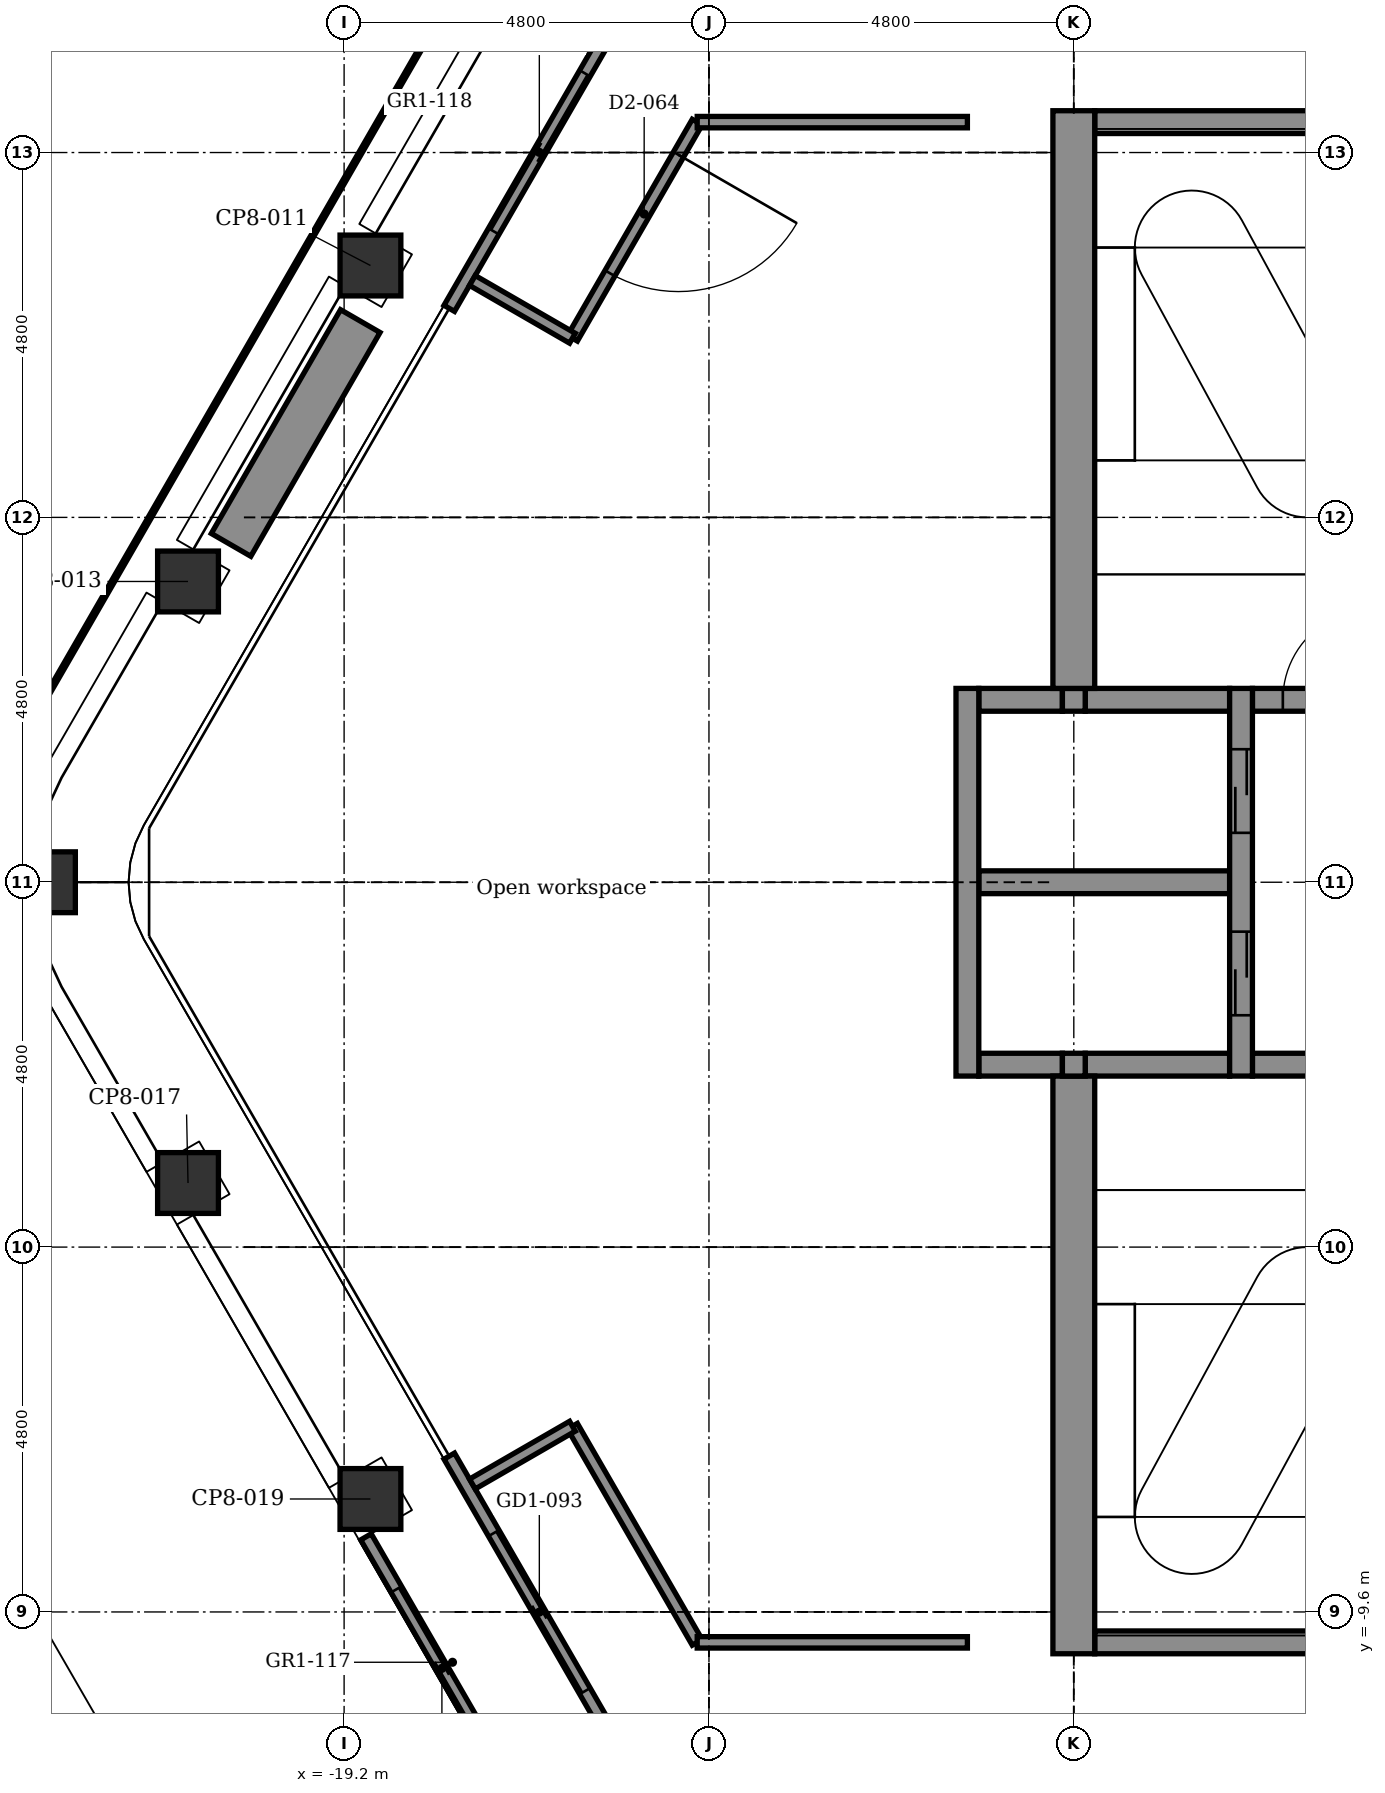
"""IFC4 building model, lengths in metres.
Left out: names, types, materials, properties, quantities, classifications, styles, units other than length and angle.
Written with IfcOpenShell. Run it as: python <this file> out.ifc"""

import sys

from ifc_helpers import new_model, si_unit, direction, frame, frame_2d, origin, origin_2d, place, context, subcontext, project, spatial, rectangle, extrude, element, fill, save


model = new_model("IFC4")
c1 = context("Model", 3, precision=1e-05, world=origin(), true_north=direction((0.0, 1.0)))
c2 = subcontext(c1, "Body", "Model", "MODEL_VIEW")
j1 = project(units=[si_unit("LENGTHUNIT", "METRE"), si_unit("PLANEANGLEUNIT", "RADIAN")], contexts=[c1])
p1 = place(None, origin())
s1 = spatial("IfcSite", under=j1, at=p1, CompositionType="ELEMENT")
p2 = place(p1, origin())
s2 = spatial("IfcBuilding", under=s1, at=p2, CompositionType="ELEMENT")
p3 = place(p2, frame((0.0, 0.0, 222.8)))
s3 = spatial("IfcBuildingStorey", under=s2, at=p3, CompositionType="ELEMENT", Elevation=222.8)
for number, where, z_axis, x_axis in (
    (1, (-18.854, -8.114, -0.15), (0.0, 0.0, 1.0), (0.866, 0.5, 0.0)),
    (2, (-21.254, -3.957, -0.15), (0.0, 0.0, 1.0), (0.866, 0.5, 0.0)),
    (3, (-23.136, 0.0, -0.15), (0.0, 0.0, 1.0), (1.0, 0.0, 0.0)),
    (4, (-21.254, 3.957, -0.15), (0.0, 0.0, 1.0), (0.5, 0.866, 0.0)),
    (5, (-18.854, 8.114, -0.15), (0.0, 0.0, 1.0), (0.5, 0.866, 0.0)),
):
    element("IfcColumn", number, at=place(p3, frame(where, z_axis=z_axis, x_axis=x_axis)), inside=s3, PredefinedType="COLUMN", context=c2, shape_type="SweptSolid", body=[
        extrude(rectangle(XDim=0.8, YDim=0.8, at=origin_2d()), origin(), (0.0, 0.0, 1.0), 3.9),
    ])
p4 = place(p3, frame((-9.325, -10.0, -0.15), z_axis=(0.0, 0.0, 1.0), x_axis=(1.0, 0.0, 0.0)))
e6 = element("IfcWall", 6, at=p4, inside=s3, PredefinedType="STANDARD", context=c2, shape_type="SweptSolid", body=[
    extrude(rectangle(XDim=4.075, YDim=0.3, at=frame_2d((2.038, 0.0))), origin(), (0.0, 0.0, 1.0), 3.9),
])
p5 = place(p3, frame((-10.85, -2.4, -0.15), z_axis=(0.0, 0.0, 1.0), x_axis=(1.0, 0.0, 0.0)))
e7 = element("IfcWall", 7, at=p5, inside=s3, PredefinedType="STANDARD", context=c2, shape_type="SweptSolid", body=[
    extrude(rectangle(XDim=1.1, YDim=0.3, at=frame_2d((0.55, 0.0))), origin(), (0.0, 0.0, 1.0), 3.9),
])
p6 = place(p3, frame((-9.45, -2.4, -0.15), z_axis=(0.0, 0.0, 1.0), x_axis=(1.0, 0.0, 0.0)))
e8 = element("IfcWall", 8, at=p6, inside=s3, PredefinedType="STANDARD", context=c2, shape_type="SweptSolid", body=[
    extrude(rectangle(XDim=1.9, YDim=0.3, at=frame_2d((0.95, 0.0))), origin(), (0.0, 0.0, 1.0), 3.9),
])
p7 = place(p3, frame((-7.25, -2.4, -0.15), z_axis=(0.0, 0.0, 1.0), x_axis=(1.0, 0.0, 0.0)))
e9 = element("IfcWall", 9, at=p7, inside=s3, PredefinedType="STANDARD", context=c2, shape_type="SweptSolid", body=[
    extrude(rectangle(XDim=2.0, YDim=0.3, at=frame_2d((1.0, 0.0))), origin(), (0.0, 0.0, 1.0), 3.9),
])
p8 = place(p3, frame((-10.85, 0.0, -0.15), z_axis=(0.0, 0.0, 1.0), x_axis=(1.0, 0.0, 0.0)))
e10 = element("IfcWall", 10, at=p8, inside=s3, PredefinedType="STANDARD", context=c2, shape_type="SweptSolid", body=[
    extrude(rectangle(XDim=3.3, YDim=0.3, at=frame_2d((1.65, 0.0))), origin(), (0.0, 0.0, 1.0), 3.9),
])
p9 = place(p3, frame((-10.85, 2.4, -0.15), z_axis=(0.0, 0.0, 1.0), x_axis=(1.0, 0.0, 0.0)))
e11 = element("IfcWall", 11, at=p9, inside=s3, PredefinedType="STANDARD", context=c2, shape_type="SweptSolid", body=[
    extrude(rectangle(XDim=1.1, YDim=0.3, at=frame_2d((0.55, 0.0))), origin(), (0.0, 0.0, 1.0), 3.9),
])
p10 = place(p3, frame((-9.45, 2.4, -0.15), z_axis=(0.0, 0.0, 1.0), x_axis=(1.0, 0.0, 0.0)))
e12 = element("IfcWall", 12, at=p10, inside=s3, PredefinedType="STANDARD", context=c2, shape_type="SweptSolid", body=[
    extrude(rectangle(XDim=1.9, YDim=0.3, at=frame_2d((0.95, 0.0))), origin(), (0.0, 0.0, 1.0), 3.9),
])
p11 = place(p3, frame((-7.25, 2.4, -0.15), z_axis=(0.0, 0.0, 1.0), x_axis=(1.0, 0.0, 0.0)))
e13 = element("IfcWall", 13, at=p11, inside=s3, PredefinedType="STANDARD", context=c2, shape_type="SweptSolid", body=[
    extrude(rectangle(XDim=2.0, YDim=0.3, at=frame_2d((1.0, 0.0))), origin(), (0.0, 0.0, 1.0), 3.9),
])
p12 = place(p11, frame((0.4, 0.0, 0.15)))
e14 = element("IfcOpeningElement", 14, at=p12, cuts=e13, PredefinedType="OPENING", context=c2, shape_type="SweptSolid", body=[
    extrude(rectangle(XDim=1.2, YDim=2.1, at=frame_2d((0.6, 1.05))), frame((0.0, 0.16, 0.0), z_axis=(0.0, -1.0, 0.0), x_axis=(1.0, 0.0, 0.0)), (0.0, 0.0, 1.0), 0.32),
])
p13 = place(p3, frame((-9.325, 10.0, -0.15), z_axis=(0.0, 0.0, 1.0), x_axis=(1.0, 0.0, 0.0)))
e15 = element("IfcWall", 15, at=p13, inside=s3, PredefinedType="STANDARD", context=c2, shape_type="SweptSolid", body=[
    extrude(rectangle(XDim=4.075, YDim=0.3, at=frame_2d((2.038, 0.0))), origin(), (0.0, 0.0, 1.0), 3.9),
])
p14 = place(p3, frame((-11.0, -2.55, -0.15), z_axis=(0.0, 0.0, 1.0), x_axis=(0.0, 1.0, 0.0)))
e16 = element("IfcWall", 16, at=p14, inside=s3, PredefinedType="STANDARD", context=c2, shape_type="SweptSolid", body=[
    extrude(rectangle(XDim=5.1, YDim=0.3, at=frame_2d((2.55, 0.0))), origin(), (0.0, 0.0, 1.0), 3.9),
])
p15 = place(p3, frame((-9.6, -10.15, -0.15), z_axis=(0.0, 0.0, 1.0), x_axis=(0.0, 1.0, 0.0)))
e17 = element("IfcWall", 17, at=p15, inside=s3, PredefinedType="SHEAR", context=c2, shape_type="SweptSolid", body=[
    extrude(rectangle(XDim=7.6, YDim=0.55, at=frame_2d((3.8, 0.0))), origin(), (0.0, 0.0, 1.0), 3.9),
])
for number, where, z_axis, x_axis in (
    (18, (-9.6, -2.55, -0.15), (0.0, 0.0, 1.0), (0.0, 1.0, 0.0)),
    (19, (-9.6, 2.25, -0.15), (0.0, 0.0, 1.0), (0.0, 1.0, 0.0)),
):
    element("IfcWall", number, at=place(p3, frame(where, z_axis=z_axis, x_axis=x_axis)), inside=s3, PredefinedType="STANDARD", context=c2, shape_type="SweptSolid", body=[
        extrude(rectangle(XDim=0.3, YDim=0.3, at=frame_2d((0.15, 0.0))), origin(), (0.0, 0.0, 1.0), 3.9),
    ])
p16 = place(p3, frame((-9.6, 2.55, -0.15), z_axis=(0.0, 0.0, 1.0), x_axis=(0.0, 1.0, 0.0)))
e20 = element("IfcWall", 20, at=p16, inside=s3, PredefinedType="SHEAR", context=c2, shape_type="SweptSolid", body=[
    extrude(rectangle(XDim=7.6, YDim=0.55, at=frame_2d((3.8, 0.0))), origin(), (0.0, 0.0, 1.0), 3.9),
])
p17 = place(p3, frame((-7.4, -2.55, -0.15), z_axis=(0.0, 0.0, 1.0), x_axis=(0.0, 1.0, 0.0)))
e21 = element("IfcWall", 21, at=p17, inside=s3, PredefinedType="STANDARD", context=c2, shape_type="SweptSolid", body=[
    extrude(rectangle(XDim=5.1, YDim=0.3, at=frame_2d((2.55, 0.0))), origin(), (0.0, 0.0, 1.0), 3.9),
])
p18 = place(p17, frame((0.8, 0.0, 0.15)))
e22 = element("IfcOpeningElement", 22, at=p18, cuts=e21, PredefinedType="OPENING", context=c2, shape_type="SweptSolid", body=[
    extrude(rectangle(XDim=1.1, YDim=2.1, at=frame_2d((0.55, 1.05))), frame((0.0, 0.16, 0.0), z_axis=(0.0, -1.0, 0.0), x_axis=(1.0, 0.0, 0.0)), (0.0, 0.0, 1.0), 0.32),
])
p19 = place(p17, frame((3.2, 0.0, 0.15)))
e23 = element("IfcOpeningElement", 23, at=p19, cuts=e21, PredefinedType="OPENING", context=c2, shape_type="SweptSolid", body=[
    extrude(rectangle(XDim=1.1, YDim=2.1, at=frame_2d((0.55, 1.05))), frame((0.0, 0.16, 0.0), z_axis=(0.0, -1.0, 0.0), x_axis=(1.0, 0.0, 0.0)), (0.0, 0.0, 1.0), 0.32),
])
p20 = place(p3, frame((-15.447, -11.655, 0.0), z_axis=(0.0, 0.0, 1.0), x_axis=(-0.499978080042, 0.866038058908, 0.0)))
e24 = element("IfcWall", 24, at=p20, inside=s3, PredefinedType="PARTITIONING", context=c2, shape_type="SweptSolid", body=[
    extrude(rectangle(XDim=4.74, YDim=0.16, at=frame_2d((2.37, 0.0))), origin(), (0.0, 0.0, 1.0), 3.75),
])
p21 = place(p20, frame((1.17, 0.0, 0.0)))
e25 = element("IfcOpeningElement", 25, at=p21, cuts=e24, PredefinedType="OPENING", context=c2, shape_type="SweptSolid", body=[
    extrude(rectangle(XDim=2.4, YDim=2.4, at=frame_2d((1.2, 1.2))), frame((0.0, 0.09, 0.0), z_axis=(0.0, -1.0, 0.0), x_axis=(1.0, 0.0, 0.0)), (0.0, 0.0, 1.0), 0.18),
])
p22 = place(p3, frame((-17.817, 7.55, 0.0), z_axis=(0.0, 0.0, 1.0), x_axis=(0.499978080042, 0.866038058908, 0.0)))
e26 = element("IfcWall", 26, at=p22, inside=s3, PredefinedType="PARTITIONING", context=c2, shape_type="SweptSolid", body=[
    extrude(rectangle(XDim=4.74, YDim=0.16, at=frame_2d((2.37, 0.0))), origin(), (0.0, 0.0, 1.0), 3.75),
])
p23 = place(p22, frame((1.17, 0.0, 0.0)))
e27 = element("IfcOpeningElement", 27, at=p23, cuts=e26, PredefinedType="OPENING", context=c2, shape_type="SweptSolid", body=[
    extrude(rectangle(XDim=2.4, YDim=2.4, at=frame_2d((1.2, 1.2))), frame((0.0, 0.09, 0.0), z_axis=(0.0, -1.0, 0.0), x_axis=(1.0, 0.0, 0.0)), (0.0, 0.0, 1.0), 0.18),
])
p24 = place(p3, frame((-20.687, 4.438, 0.0), z_axis=(0.0, 0.0, 1.0), x_axis=(0.500008388397, 0.866020560687, 0.0)))
e28 = element("IfcWall", 28, at=p24, inside=s3, PredefinedType="USERDEFINED", context=c2, shape_type="SweptSolid", body=[
    extrude(rectangle(XDim=3.4, YDim=0.6, at=frame_2d((1.7, 0.0))), origin(), (0.0, 0.0, 1.0), 0.7),
])
p25 = place(p3, frame((-16.914, -12.073, 0.0), z_axis=(0.0, 0.0, 1.0), x_axis=(-0.500029202507, 0.866008543052, 0.0)))
e29 = element("IfcWall", 29, at=p25, inside=s3, PredefinedType="PARTITIONING", context=c2, shape_type="SweptSolid", body=[
    extrude(rectangle(XDim=3.996, YDim=0.16, at=frame_2d((1.998, 0.0))), origin(), (0.0, 0.0, 1.0), 2.85),
])
p26 = place(p25, frame((0.798, 0.0, 0.0)))
e30 = element("IfcOpeningElement", 30, at=p26, cuts=e29, PredefinedType="OPENING", context=c2, shape_type="SweptSolid", body=[
    extrude(rectangle(XDim=2.4, YDim=2.4, at=frame_2d((1.2, 1.2))), frame((0.0, 0.09, 0.0), z_axis=(0.0, -1.0, 0.0), x_axis=(1.0, 0.0, 0.0)), (0.0, 0.0, 1.0), 0.18),
])
p27 = place(p3, frame((-16.196, -7.157, 0.0), z_axis=(0.0, 0.0, 1.0), x_axis=(0.499954196102, -0.866051847062, 0.0)))
e31 = element("IfcWall", 31, at=p27, inside=s3, PredefinedType="PARTITIONING", context=c2, shape_type="SweptSolid", body=[
    extrude(rectangle(XDim=3.283, YDim=0.15, at=frame_2d((1.642, 0.0))), origin(), (0.0, 0.0, 1.0), 3.75),
])
p28 = place(p3, frame((-16.196, 7.157, 0.0), z_axis=(0.0, 0.0, 1.0), x_axis=(0.499954196102, 0.866051847062, 0.0)))
e32 = element("IfcWall", 32, at=p28, inside=s3, PredefinedType="PARTITIONING", context=c2, shape_type="SweptSolid", body=[
    extrude(rectangle(XDim=3.283, YDim=0.15, at=frame_2d((1.642, 0.0))), origin(), (0.0, 0.0, 1.0), 3.75),
])
p29 = place(p28, frame((0.987, 0.0, 0.0)))
e33 = element("IfcOpeningElement", 33, at=p29, cuts=e32, PredefinedType="OPENING", context=c2, shape_type="SweptSolid", body=[
    extrude(rectangle(XDim=1.8, YDim=2.1, at=frame_2d((0.9, 1.05))), frame((0.0, 0.085, 0.0), z_axis=(0.0, -1.0, 0.0), x_axis=(1.0, 0.0, 0.0)), (0.0, 0.0, 1.0), 0.17),
])
for number, where, z_axis, x_axis in (
    (34, (-17.512, 7.917, 0.0), (0.0, 0.0, 1.0), (0.866, -0.5, 0.0)),
    (35, (-17.512, -7.917, 0.0), (0.0, 0.0, 1.0), (0.866, 0.5, 0.0)),
):
    element("IfcWall", number, at=place(p3, frame(where, z_axis=z_axis, x_axis=x_axis)), inside=s3, PredefinedType="PARTITIONING", context=c2, shape_type="SweptSolid", body=[
        extrude(rectangle(XDim=1.52, YDim=0.15, at=frame_2d((0.76, 0.0))), origin(), (0.0, 0.0, 1.0), 3.75),
    ])
for number, where, z_axis, x_axis in (
    (36, (-14.555, -10.0, 0.0), (0.0, 0.0, 1.0), (1.0, 0.0, 0.0)),
    (37, (-14.555, 10.0, 0.0), (0.0, 0.0, 1.0), (1.0, 0.0, 0.0)),
):
    element("IfcWall", number, at=place(p3, frame(where, z_axis=z_axis, x_axis=x_axis)), inside=s3, PredefinedType="PARTITIONING", context=c2, shape_type="SweptSolid", body=[
        extrude(rectangle(XDim=3.555, YDim=0.15, at=frame_2d((1.777, 0.0))), origin(), (0.0, 0.0, 1.0), 3.75),
    ])
p30 = place(p21, origin())
e38 = element("IfcDoor", 38, at=p30, inside=s3, OperationType="DOUBLE_DOOR_SLIDING", PredefinedType="DOOR", context=c2, shape_type="SweptSolid", body=[
    extrude(rectangle(XDim=2.4, YDim=2.4, at=frame_2d((1.2, 1.2))), frame((0.0, 0.025, 0.0), z_axis=(0.0, -1.0, 0.0), x_axis=(1.0, 0.0, 0.0)), (0.0, 0.0, 1.0), 0.05),
])
fill(e25, e38)
p31 = place(p23, origin())
e39 = element("IfcDoor", 39, at=p31, inside=s3, OperationType="DOUBLE_DOOR_SLIDING", PredefinedType="DOOR", context=c2, shape_type="SweptSolid", body=[
    extrude(rectangle(XDim=2.4, YDim=2.4, at=frame_2d((1.2, 1.2))), frame((0.0, 0.025, 0.0), z_axis=(0.0, -1.0, 0.0), x_axis=(1.0, 0.0, 0.0)), (0.0, 0.0, 1.0), 0.05),
])
fill(e27, e39)
p32 = place(p26, origin())
e40 = element("IfcDoor", 40, at=p32, inside=s3, OperationType="DOUBLE_DOOR_SLIDING", PredefinedType="DOOR", context=c2, shape_type="SweptSolid", body=[
    extrude(rectangle(XDim=2.4, YDim=2.4, at=frame_2d((1.2, 1.2))), frame((0.0, 0.025, 0.0), z_axis=(0.0, -1.0, 0.0), x_axis=(1.0, 0.0, 0.0)), (0.0, 0.0, 1.0), 0.05),
])
fill(e30, e40)
p33 = place(p29, frame((1.8, 0.0, 0.0), z_axis=(0.0, 0.0, 1.0), x_axis=(-1.0, 0.0, 0.0)))
e41 = element("IfcDoor", 41, at=p33, inside=s3, OperationType="SINGLE_SWING_RIGHT", PredefinedType="DOOR", context=c2, shape_type="SweptSolid", body=[
    extrude(rectangle(XDim=1.8, YDim=2.1, at=frame_2d((0.9, 1.05))), frame((0.0, 0.025, 0.0), z_axis=(0.0, -1.0, 0.0), x_axis=(1.0, 0.0, 0.0)), (0.0, 0.0, 1.0), 0.05),
])
fill(e33, e41)
p34 = place(p18, origin())
e42 = element("IfcDoor", 42, at=p34, inside=s3, OperationType="DOUBLE_DOOR_SLIDING", PredefinedType="DOOR", context=c2, shape_type="SweptSolid", body=[
    extrude(rectangle(XDim=1.1, YDim=2.1, at=frame_2d((0.55, 1.05))), frame((0.0, 0.025, 0.0), z_axis=(0.0, -1.0, 0.0), x_axis=(1.0, 0.0, 0.0)), (0.0, 0.0, 1.0), 0.05),
])
fill(e22, e42)
p35 = place(p19, origin())
e43 = element("IfcDoor", 43, at=p35, inside=s3, OperationType="DOUBLE_DOOR_SLIDING", PredefinedType="DOOR", context=c2, shape_type="SweptSolid", body=[
    extrude(rectangle(XDim=1.1, YDim=2.1, at=frame_2d((0.55, 1.05))), frame((0.0, 0.025, 0.0), z_axis=(0.0, -1.0, 0.0), x_axis=(1.0, 0.0, 0.0)), (0.0, 0.0, 1.0), 0.05),
])
fill(e23, e43)
p36 = place(p12, origin())
e44 = element("IfcDoor", 44, at=p36, inside=s3, OperationType="SINGLE_SWING_RIGHT", PredefinedType="DOOR", context=c2, shape_type="SweptSolid", body=[
    extrude(rectangle(XDim=1.2, YDim=2.1, at=frame_2d((0.6, 1.05))), frame((0.0, 0.025, 0.0), z_axis=(0.0, -1.0, 0.0), x_axis=(1.0, 0.0, 0.0)), (0.0, 0.0, 1.0), 0.05),
])
fill(e14, e44)
save(model, sys.argv[1])
